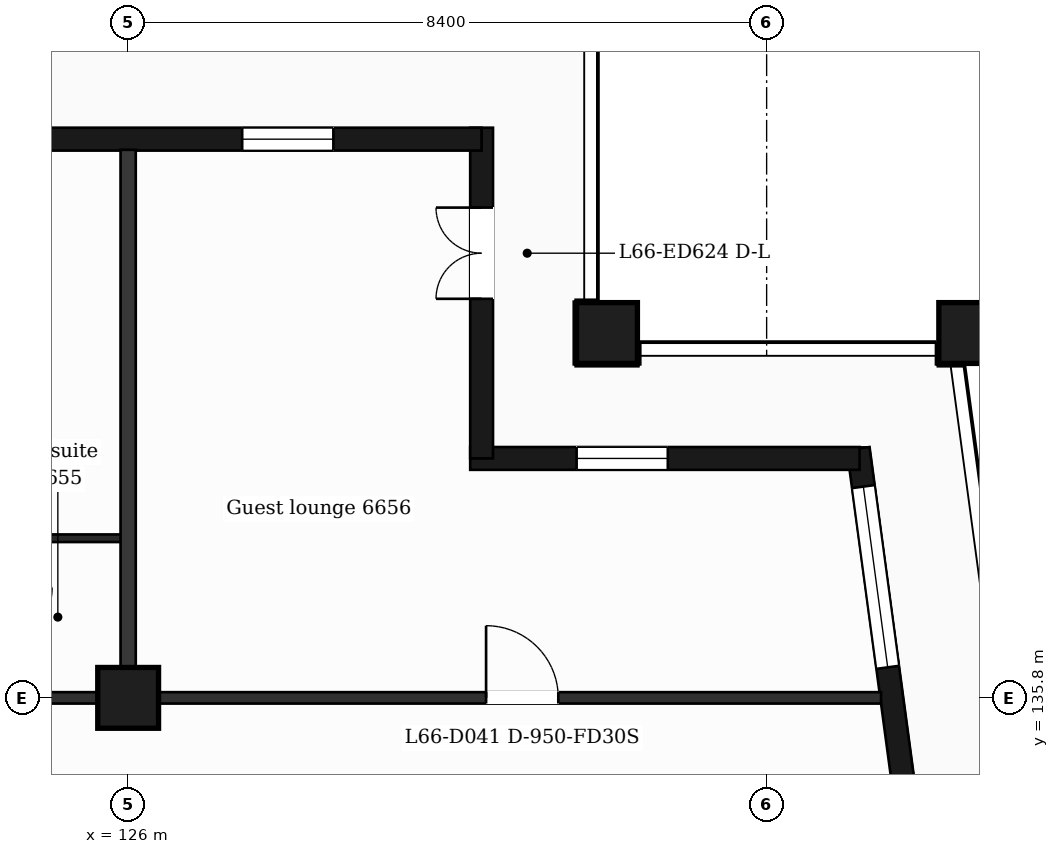
"""IFC4 building model, lengths in metres.
Left out: names, types, materials, properties, quantities, classifications, styles, units other than length and angle.
Written with IfcOpenShell. Run it as: python <this file> out.ifc"""

import sys

from ifc_helpers import new_model, si_unit, direction, frame, frame_2d, origin, origin_2d, place, context, subcontext, project, spatial, rectangle, extrude, element, fill, save


model = new_model("IFC4")
c1 = context("Model", 3, precision=1e-05, world=origin(), true_north=direction((0.0, 1.0)))
c2 = subcontext(c1, "Body", "Model", "MODEL_VIEW")
j1 = project(units=[si_unit("LENGTHUNIT", "METRE"), si_unit("PLANEANGLEUNIT", "RADIAN")], contexts=[c1])
p1 = place(None, origin())
s1 = spatial("IfcSite", under=j1, at=p1, CompositionType="ELEMENT")
p2 = place(p1, origin())
s2 = spatial("IfcBuilding", under=s1, at=p2, CompositionType="ELEMENT")
p3 = place(p2, frame((0.0, 0.0, 273.8)))
s3 = spatial("IfcBuildingStorey", under=s2, at=p3, CompositionType="ELEMENT", Elevation=273.8)
for number, where, z_axis, x_axis in (
    (1, (132.3, 140.6, 0.0), (0.0, 0.0, 1.0), (1.0, 0.0, 0.0)),
    (2, (137.065, 140.6, 0.0), (0.0, 0.0, 1.0), (1.0, 0.0, 0.0)),
    (3, (126.0, 135.8, 0.0), (0.0, 0.0, 1.0), (1.0, 0.0, 0.0)),
):
    element("IfcColumn", number, at=place(p3, frame(where, z_axis=z_axis, x_axis=x_axis)), inside=s3, PredefinedType="COLUMN", context=c2, shape_type="SweptSolid", body=[
        extrude(rectangle(XDim=0.8, YDim=0.8, at=origin_2d()), origin(), (0.0, 0.0, 1.0), 3.7),
    ])
p4 = place(p3, frame((136.504, 132.4, 0.0), z_axis=(0.0, 0.0, 1.0), x_axis=(-0.133399697462, 0.99106231929, 0.0)))
e4 = element("IfcWall", 4, at=p4, inside=s3, PredefinedType="SOLIDWALL", context=c2, shape_type="SweptSolid", body=[
    extrude(rectangle(XDim=6.74, YDim=0.3, at=frame_2d((3.37, 0.0))), origin(), (0.0, 0.0, 1.0), 3.38),
])
p5 = place(p4, frame((1.115, 0.0, 0.0)))
e5 = element("IfcOpeningElement", 5, at=p5, cuts=e4, PredefinedType="OPENING", context=c2, shape_type="SweptSolid", body=[
    extrude(rectangle(XDim=1.2, YDim=2.4, at=frame_2d((0.6, 1.2))), frame((0.0, 0.16, 0.0), z_axis=(0.0, -1.0, 0.0), x_axis=(1.0, 0.0, 0.0)), (0.0, 0.0, 1.0), 0.32),
])
p6 = place(p4, frame((3.835, 0.0, 0.9)))
e6 = element("IfcOpeningElement", 6, at=p6, cuts=e4, PredefinedType="OPENING", context=c2, shape_type="SweptSolid", body=[
    extrude(rectangle(XDim=2.4, YDim=2.1, at=frame_2d((1.2, 1.05))), frame((0.0, 0.16, 0.0), z_axis=(0.0, -1.0, 0.0), x_axis=(1.0, 0.0, 0.0)), (0.0, 0.0, 1.0), 0.32),
])
p7 = place(p3, frame((135.623, 138.95, 0.0), z_axis=(0.0, 0.0, 1.0), x_axis=(-1.0, 0.0, 0.0)))
e7 = element("IfcWall", 7, at=p7, inside=s3, PredefinedType="SOLIDWALL", context=c2, shape_type="SweptSolid", body=[
    extrude(rectangle(XDim=5.123, YDim=0.3, at=frame_2d((2.561, 0.0))), origin(), (0.0, 0.0, 1.0), 3.38),
])
p8 = place(p7, frame((2.523, 0.0, 0.9)))
e8 = element("IfcOpeningElement", 8, at=p8, cuts=e7, PredefinedType="OPENING", context=c2, shape_type="SweptSolid", body=[
    extrude(rectangle(XDim=1.2, YDim=2.1, at=frame_2d((0.6, 1.05))), frame((0.0, 0.16, 0.0), z_axis=(0.0, -1.0, 0.0), x_axis=(1.0, 0.0, 0.0)), (0.0, 0.0, 1.0), 0.32),
])
p9 = place(p3, frame((130.65, 138.95, 0.0), z_axis=(0.0, 0.0, 1.0), x_axis=(0.0, 1.0, 0.0)))
e9 = element("IfcWall", 9, at=p9, inside=s3, PredefinedType="SOLIDWALL", context=c2, shape_type="SweptSolid", body=[
    extrude(rectangle(XDim=4.35, YDim=0.3, at=frame_2d((2.175, 0.0))), origin(), (0.0, 0.0, 1.0), 3.38),
])
p10 = place(p9, frame((2.1, 0.0, 0.0)))
e10 = element("IfcOpeningElement", 10, at=p10, cuts=e9, PredefinedType="OPENING", context=c2, shape_type="SweptSolid", body=[
    extrude(rectangle(XDim=1.2, YDim=2.4, at=frame_2d((0.6, 1.2))), frame((0.0, 0.16, 0.0), z_axis=(0.0, -1.0, 0.0), x_axis=(1.0, 0.0, 0.0)), (0.0, 0.0, 1.0), 0.32),
])
p11 = place(p3, frame((130.65, 143.15, 0.0), z_axis=(0.0, 0.0, 1.0), x_axis=(-1.0, 0.0, 0.0)))
e11 = element("IfcWall", 11, at=p11, inside=s3, PredefinedType="SOLIDWALL", context=c2, shape_type="SweptSolid", body=[
    extrude(rectangle(XDim=16.35, YDim=0.3, at=frame_2d((8.175, 0.0))), origin(), (0.0, 0.0, 1.0), 3.38),
])
p12 = place(p11, frame((1.95, 0.0, 0.9)))
e12 = element("IfcOpeningElement", 12, at=p12, cuts=e11, PredefinedType="OPENING", context=c2, shape_type="SweptSolid", body=[
    extrude(rectangle(XDim=1.2, YDim=2.1, at=frame_2d((0.6, 1.05))), frame((0.0, 0.16, 0.0), z_axis=(0.0, -1.0, 0.0), x_axis=(1.0, 0.0, 0.0)), (0.0, 0.0, 1.0), 0.32),
])
p13 = place(p11, frame((6.15, 0.0, 0.0)))
e13 = element("IfcOpeningElement", 13, at=p13, cuts=e11, PredefinedType="OPENING", context=c2, shape_type="SweptSolid", body=[
    extrude(rectangle(XDim=1.2, YDim=2.4, at=frame_2d((0.6, 1.2))), frame((0.0, 0.16, 0.0), z_axis=(0.0, -1.0, 0.0), x_axis=(1.0, 0.0, 0.0)), (0.0, 0.0, 1.0), 0.32),
])
p14 = place(p11, frame((9.75, 0.0, 0.9)))
e14 = element("IfcOpeningElement", 14, at=p14, cuts=e11, PredefinedType="OPENING", context=c2, shape_type="SweptSolid", body=[
    extrude(rectangle(XDim=2.4, YDim=2.1, at=frame_2d((1.2, 1.05))), frame((0.0, 0.16, 0.0), z_axis=(0.0, -1.0, 0.0), x_axis=(1.0, 0.0, 0.0)), (0.0, 0.0, 1.0), 0.32),
])
p15 = place(p11, frame((13.45, 0.0, 0.9)))
e15 = element("IfcOpeningElement", 15, at=p15, cuts=e11, PredefinedType="OPENING", context=c2, shape_type="SweptSolid", body=[
    extrude(rectangle(XDim=2.4, YDim=2.1, at=frame_2d((1.2, 1.05))), frame((0.0, 0.16, 0.0), z_axis=(0.0, -1.0, 0.0), x_axis=(1.0, 0.0, 0.0)), (0.0, 0.0, 1.0), 0.32),
])
p16 = place(p3, frame((90.895, 135.8, 0.0), z_axis=(0.0, 0.0, 1.0), x_axis=(1.0, 0.0, 0.0)))
e16 = element("IfcWall", 16, at=p16, inside=s3, PredefinedType="PARTITIONING", context=c2, shape_type="SweptSolid", body=[
    extrude(rectangle(XDim=45.011, YDim=0.15, at=frame_2d((22.505, 0.0))), origin(), (0.0, 0.0, 1.0), 3.38),
])
p17 = place(p16, frame((8.005, 0.0, 0.0)))
e17 = element("IfcOpeningElement", 17, at=p17, cuts=e16, PredefinedType="OPENING", context=c2, shape_type="SweptSolid", body=[
    extrude(rectangle(XDim=1.0, YDim=2.1, at=frame_2d((0.5, 1.05))), frame((0.0, 0.085, 0.0), z_axis=(0.0, -1.0, 0.0), x_axis=(1.0, 0.0, 0.0)), (0.0, 0.0, 1.0), 0.17),
])
p18 = place(p16, frame((10.515, 0.0, 0.0)))
e18 = element("IfcOpeningElement", 18, at=p18, cuts=e16, PredefinedType="OPENING", context=c2, shape_type="SweptSolid", body=[
    extrude(rectangle(XDim=1.0, YDim=2.1, at=frame_2d((0.5, 1.05))), frame((0.0, 0.085, 0.0), z_axis=(0.0, -1.0, 0.0), x_axis=(1.0, 0.0, 0.0)), (0.0, 0.0, 1.0), 0.17),
])
p19 = place(p16, frame((20.156, 0.0, 0.0)))
e19 = element("IfcOpeningElement", 19, at=p19, cuts=e16, PredefinedType="OPENING", context=c2, shape_type="SweptSolid", body=[
    extrude(rectangle(XDim=1.0, YDim=2.1, at=frame_2d((0.5, 1.05))), frame((0.0, 0.085, 0.0), z_axis=(0.0, -1.0, 0.0), x_axis=(1.0, 0.0, 0.0)), (0.0, 0.0, 1.0), 0.17),
])
p20 = place(p16, frame((24.13, 0.0, 0.0)))
e20 = element("IfcOpeningElement", 20, at=p20, cuts=e16, PredefinedType="OPENING", context=c2, shape_type="SweptSolid", body=[
    extrude(rectangle(XDim=0.95, YDim=2.1, at=frame_2d((0.475, 1.05))), frame((0.0, 0.085, 0.0), z_axis=(0.0, -1.0, 0.0), x_axis=(1.0, 0.0, 0.0)), (0.0, 0.0, 1.0), 0.17),
])
p21 = place(p16, frame((29.492, 0.0, 0.0)))
e21 = element("IfcOpeningElement", 21, at=p21, cuts=e16, PredefinedType="OPENING", context=c2, shape_type="SweptSolid", body=[
    extrude(rectangle(XDim=0.95, YDim=2.1, at=frame_2d((0.475, 1.05))), frame((0.0, 0.085, 0.0), z_axis=(0.0, -1.0, 0.0), x_axis=(1.0, 0.0, 0.0)), (0.0, 0.0, 1.0), 0.17),
])
p22 = place(p16, frame((31.705, 0.0, 0.0)))
e22 = element("IfcOpeningElement", 22, at=p22, cuts=e16, PredefinedType="OPENING", context=c2, shape_type="SweptSolid", body=[
    extrude(rectangle(XDim=0.95, YDim=2.1, at=frame_2d((0.475, 1.05))), frame((0.0, 0.085, 0.0), z_axis=(0.0, -1.0, 0.0), x_axis=(1.0, 0.0, 0.0)), (0.0, 0.0, 1.0), 0.17),
])
p23 = place(p16, frame((39.814, 0.0, 0.0)))
e23 = element("IfcOpeningElement", 23, at=p23, cuts=e16, PredefinedType="OPENING", context=c2, shape_type="SweptSolid", body=[
    extrude(rectangle(XDim=0.95, YDim=2.1, at=frame_2d((0.475, 1.05))), frame((0.0, 0.085, 0.0), z_axis=(0.0, -1.0, 0.0), x_axis=(1.0, 0.0, 0.0)), (0.0, 0.0, 1.0), 0.17),
])
p24 = place(p3, frame((124.15, 137.9, 0.0), z_axis=(0.0, 0.0, 1.0), x_axis=(1.0, 0.0, 0.0)))
e24 = element("IfcWall", 24, at=p24, inside=s3, PredefinedType="PARTITIONING", context=c2, shape_type="SweptSolid", body=[
    extrude(rectangle(XDim=1.85, YDim=0.1, at=frame_2d((0.925, 0.0))), origin(), (0.0, 0.0, 1.0), 3.38),
])
p25 = place(p3, frame((126.0, 135.875, 0.0), z_axis=(0.0, 0.0, 1.0), x_axis=(0.0, 1.0, 0.0)))
e25 = element("IfcWall", 25, at=p25, inside=s3, PredefinedType="PARTITIONING", context=c2, shape_type="SweptSolid", body=[
    extrude(rectangle(XDim=7.135, YDim=0.2, at=frame_2d((3.567, 0.0))), origin(), (0.0, 0.0, 1.0), 3.38),
])
p26 = place(p6, origin())
e26 = element("IfcWindow", 26, at=p26, inside=s3, PartitioningType="SINGLE_PANEL", PredefinedType="WINDOW", context=c2, shape_type="SweptSolid", body=[
    extrude(rectangle(XDim=2.4, YDim=2.1, at=frame_2d((1.2, 1.05))), frame((0.0, 0.03, 0.0), z_axis=(0.0, -1.0, 0.0), x_axis=(1.0, 0.0, 0.0)), (0.0, 0.0, 1.0), 0.06),
])
fill(e6, e26)
p27 = place(p8, origin())
e27 = element("IfcWindow", 27, at=p27, inside=s3, PartitioningType="SINGLE_PANEL", PredefinedType="WINDOW", context=c2, shape_type="SweptSolid", body=[
    extrude(rectangle(XDim=1.2, YDim=2.1, at=frame_2d((0.6, 1.05))), frame((0.0, 0.03, 0.0), z_axis=(0.0, -1.0, 0.0), x_axis=(1.0, 0.0, 0.0)), (0.0, 0.0, 1.0), 0.06),
])
fill(e8, e27)
p28 = place(p10, origin())
e28 = element("IfcDoor", 28, at=p28, inside=s3, OperationType="DOUBLE_DOOR_SINGLE_SWING", PredefinedType="DOOR", context=c2, shape_type="SweptSolid", body=[
    extrude(rectangle(XDim=1.2, YDim=2.4, at=frame_2d((0.6, 1.2))), frame((0.0, 0.025, 0.0), z_axis=(0.0, -1.0, 0.0), x_axis=(1.0, 0.0, 0.0)), (0.0, 0.0, 1.0), 0.05),
])
fill(e10, e28)
p29 = place(p12, origin())
e29 = element("IfcWindow", 29, at=p29, inside=s3, PartitioningType="SINGLE_PANEL", PredefinedType="WINDOW", context=c2, shape_type="SweptSolid", body=[
    extrude(rectangle(XDim=1.2, YDim=2.1, at=frame_2d((0.6, 1.05))), frame((0.0, 0.03, 0.0), z_axis=(0.0, -1.0, 0.0), x_axis=(1.0, 0.0, 0.0)), (0.0, 0.0, 1.0), 0.06),
])
fill(e12, e29)
p30 = place(p23, origin())
e30 = element("IfcDoor", 30, at=p30, inside=s3, OperationType="SINGLE_SWING_LEFT", PredefinedType="DOOR", context=c2, shape_type="SweptSolid", body=[
    extrude(rectangle(XDim=0.95, YDim=2.1, at=frame_2d((0.475, 1.05))), frame((0.0, 0.025, 0.0), z_axis=(0.0, -1.0, 0.0), x_axis=(1.0, 0.0, 0.0)), (0.0, 0.0, 1.0), 0.05),
])
fill(e23, e30)
save(model, sys.argv[1])
